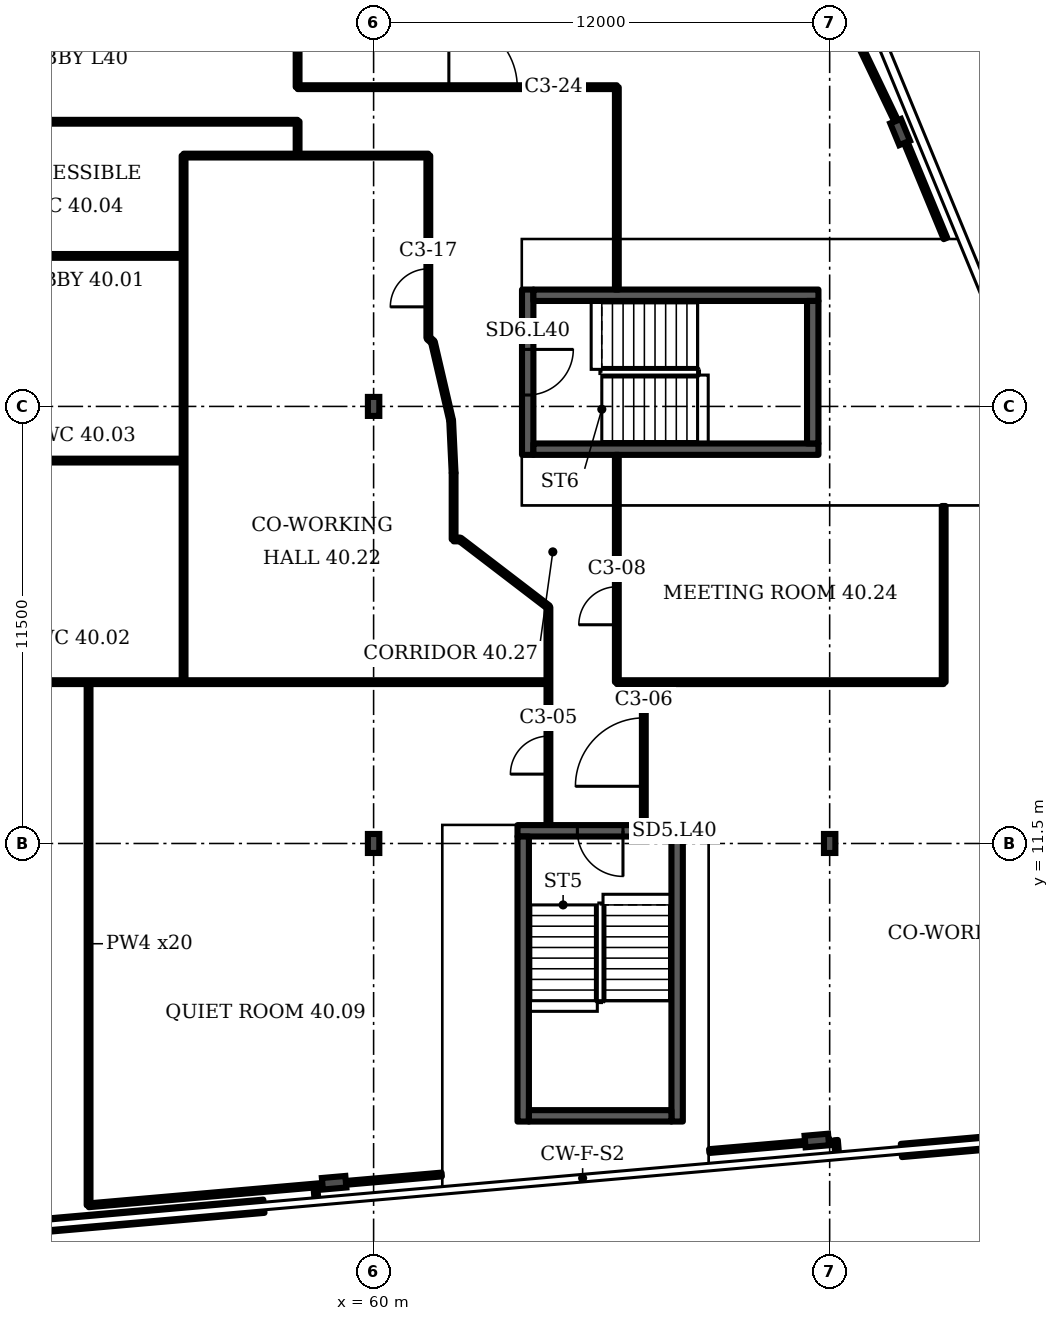
"""IFC4 building model, lengths in metres.
Left out: names, types, materials, properties, quantities, classifications, styles, units other than length and angle.
Written with IfcOpenShell. Run it as: python <this file> out.ifc"""

import sys

from ifc_helpers import new_model, si_unit, direction, frame, frame_2d, origin, origin_2d, place, context, subcontext, project, spatial, rectangle, i_section, extrude, element, fill, save


model = new_model("IFC4")
c1 = context("Model", 3, precision=1e-05, world=origin(), true_north=direction((0.0, 1.0)))
c2 = subcontext(c1, "Body", "Model", "MODEL_VIEW")
j1 = project(units=[si_unit("LENGTHUNIT", "METRE"), si_unit("PLANEANGLEUNIT", "RADIAN")], contexts=[c1])
p1 = place(None, origin())
s1 = spatial("IfcSite", under=j1, at=p1, CompositionType="ELEMENT")
p2 = place(p1, origin())
s2 = spatial("IfcBuilding", under=s1, at=p2, CompositionType="ELEMENT")
p3 = place(p2, frame((0.0, 0.0, 166.3)))
s3 = spatial("IfcBuildingStorey", under=s2, at=p3, CompositionType="ELEMENT", Elevation=166.3)
for number, where, z_axis, x_axis in (
    (1, (58.961, 2.573, 0.0), (0.0, 0.0, 1.0), (0.087, -0.996, 0.0)),
    (2, (71.662, 3.685, 0.0), (0.0, 0.0, 1.0), (0.087, -0.996, 0.0)),
    (3, (73.854, 30.219, 0.0), (0.0, 0.0, 1.0), (0.924, 0.382, 0.0)),
):
    element("IfcColumn", number, at=place(p3, frame(where, z_axis=z_axis, x_axis=x_axis)), inside=s3, PredefinedType="COLUMN", context=c2, shape_type="SweptSolid", body=[
        extrude(i_section(OverallWidth=0.305, OverallDepth=0.62, WebThickness=0.021, FlangeThickness=0.04, FilletRadius=0.027, at=origin_2d()), origin(), (0.0, 0.0, 1.0), 3.6),
    ])
for number, where, z_axis, x_axis in (
    (4, (60.0, 11.5, 0.0), (0.0, 0.0, 1.0), (1.0, 0.0, 0.0)),
    (5, (72.0, 11.5, 0.0), (0.0, 0.0, 1.0), (1.0, 0.0, 0.0)),
    (6, (60.0, 23.0, 0.0), (0.0, 0.0, 1.0), (1.0, 0.0, 0.0)),
):
    element("IfcColumn", number, at=place(p3, frame(where, z_axis=z_axis, x_axis=x_axis)), inside=s3, PredefinedType="COLUMN", context=c2, shape_type="SweptSolid", body=[
        extrude(i_section(OverallWidth=0.3, OverallDepth=0.5, WebThickness=0.014, FlangeThickness=0.028, FilletRadius=0.027, at=origin_2d()), origin(), (0.0, 0.0, 1.0), 3.6),
    ])
p4 = place(p3, frame((46.045, 0.987, 0.0), z_axis=(0.0, 0.0, 1.0), x_axis=(0.996193, 0.087171, 0.0)))
e7 = element("IfcWall", 7, at=p4, inside=s3, PredefinedType="SOLIDWALL", context=c2, shape_type="SweptSolid", body=[
    extrude(rectangle(XDim=11.11, YDim=0.35, at=frame_2d((5.555, 0.0))), origin(), (0.0, 0.0, 1.0), 1.0),
])
p5 = place(p3, frame((73.887, 3.423, 0.0), z_axis=(0.0, 0.0, 1.0), x_axis=(0.996197, 0.087145, 0.0)))
e8 = element("IfcWall", 8, at=p5, inside=s3, PredefinedType="SOLIDWALL", context=c2, shape_type="SweptSolid", body=[
    extrude(rectangle(XDim=9.323, YDim=0.35, at=frame_2d((4.662, 0.0))), origin(), (0.0, 0.0, 1.0), 1.0),
])
p6 = place(p3, frame((63.786, 11.834, 0.0), z_axis=(0.0, 0.0, 1.0), x_axis=(1.0, 0.0, 0.0)))
e9 = element("IfcWall", 9, at=p6, inside=s3, PredefinedType="SHEAR", context=c2, shape_type="SweptSolid", body=[
    extrude(rectangle(XDim=4.35, YDim=0.3, at=frame_2d((2.175, 0.0))), origin(), (0.0, 0.0, 1.0), 3.2),
])
p7 = place(p6, frame((1.575, 0.0, 0.0)))
e10 = element("IfcOpeningElement", 10, at=p7, cuts=e9, PredefinedType="OPENING", context=c2, shape_type="SweptSolid", body=[
    extrude(rectangle(XDim=1.2, YDim=2.1, at=frame_2d((0.6, 1.05))), frame((0.0, 0.16, 0.0), z_axis=(0.0, -1.0, 0.0), x_axis=(1.0, 0.0, 0.0)), (0.0, 0.0, 1.0), 0.32),
])
p8 = place(p3, frame((64.055, 21.725, 0.0), z_axis=(0.0, 0.0, 1.0), x_axis=(0.0, 1.0, 0.0)))
e11 = element("IfcWall", 11, at=p8, inside=s3, PredefinedType="SHEAR", context=c2, shape_type="SweptSolid", body=[
    extrude(rectangle(XDim=4.35, YDim=0.3, at=frame_2d((2.175, 0.0))), origin(), (0.0, 0.0, 1.0), 3.2),
])
p9 = place(p8, frame((1.575, 0.0, 0.0)))
e12 = element("IfcOpeningElement", 12, at=p9, cuts=e11, PredefinedType="OPENING", context=c2, shape_type="SweptSolid", body=[
    extrude(rectangle(XDim=1.2, YDim=2.1, at=frame_2d((0.6, 1.05))), frame((0.0, 0.16, 0.0), z_axis=(0.0, -1.0, 0.0), x_axis=(1.0, 0.0, 0.0)), (0.0, 0.0, 1.0), 0.32),
])
p10 = place(p3, frame((46.91, 15.745, 0.0), z_axis=(0.0, 0.0, 1.0), x_axis=(1.0, 0.0, 0.0)))
e13 = element("IfcWall", 13, at=p10, inside=s3, PredefinedType="PARTITIONING", context=c2, shape_type="SweptSolid", body=[
    extrude(rectangle(XDim=17.69, YDim=0.1, at=frame_2d((8.845, 0.0))), origin(), (0.0, 0.0, 1.0), 3.2),
])
p11 = place(p3, frame((46.91, 30.49, 0.0), z_axis=(0.0, 0.0, 1.0), x_axis=(1.0, 0.0, 0.0)))
e14 = element("IfcWall", 14, at=p11, inside=s3, PredefinedType="PARTITIONING", context=c2, shape_type="SweptSolid", body=[
    extrude(rectangle(XDim=11.09, YDim=0.1, at=frame_2d((5.545, 0.0))), origin(), (0.0, 0.0, 1.0), 3.2),
])
p12 = place(p11, frame((0.235, 0.0, 0.0)))
e15 = element("IfcOpeningElement", 15, at=p12, cuts=e14, PredefinedType="OPENING", context=c2, shape_type="SweptSolid", body=[
    extrude(rectangle(XDim=1.1, YDim=2.1, at=frame_2d((0.55, 1.05))), frame((0.0, 0.06, 0.0), z_axis=(0.0, -1.0, 0.0), x_axis=(1.0, 0.0, 0.0)), (0.0, 0.0, 1.0), 0.12),
])
for number, where, z_axis, x_axis in (
    (16, (48.7, 21.575, 0.0), (0.0, 0.0, 1.0), (1.0, 0.0, 0.0)),
    (17, (48.7, 26.96, 0.0), (0.0, 0.0, 1.0), (1.0, 0.0, 0.0)),
):
    element("IfcWall", number, at=place(p3, frame(where, z_axis=z_axis, x_axis=x_axis)), inside=s3, PredefinedType="PARTITIONING", context=c2, shape_type="SweptSolid", body=[
        extrude(rectangle(XDim=6.3, YDim=0.1, at=frame_2d((3.15, 0.0))), origin(), (0.0, 0.0, 1.0), 3.2),
    ])
p13 = place(p3, frame((52.5, 1.98, 0.0), z_axis=(0.0, 0.0, 1.0), x_axis=(0.0, 1.0, 0.0)))
e18 = element("IfcWall", 18, at=p13, inside=s3, PredefinedType="PARTITIONING", context=c2, shape_type="SweptSolid", body=[
    extrude(rectangle(XDim=13.765, YDim=0.1, at=frame_2d((6.883, 0.0))), origin(), (0.0, 0.0, 1.0), 3.2),
])
p14 = place(p3, frame((52.5, 1.98, 0.0), z_axis=(0.0, 0.0, 1.0), x_axis=(0.99622, 0.086844, 0.0)))
e19 = element("IfcWall", 19, at=p14, inside=s3, PredefinedType="PARTITIONING", context=c2, shape_type="SweptSolid", body=[
    extrude(rectangle(XDim=9.328, YDim=0.1, at=frame_2d((4.664, 0.0))), origin(), (0.0, 0.0, 1.0), 2.58),
])
p15 = place(p3, frame((55.0, 15.745, 0.0), z_axis=(0.0, 0.0, 1.0), x_axis=(0.0, 1.0, 0.0)))
e20 = element("IfcWall", 20, at=p15, inside=s3, PredefinedType="PARTITIONING", context=c2, shape_type="SweptSolid", body=[
    extrude(rectangle(XDim=13.855, YDim=0.1, at=frame_2d((6.927, 0.0))), origin(), (0.0, 0.0, 1.0), 3.2),
])
p16 = place(p3, frame((55.0, 29.6, 0.0), z_axis=(0.0, 0.0, 1.0), x_axis=(1.0, 0.0, 0.0)))
e21 = element("IfcWall", 21, at=p16, inside=s3, PredefinedType="PARTITIONING", context=c2, shape_type="SweptSolid", body=[
    extrude(rectangle(XDim=6.44, YDim=0.1, at=frame_2d((3.22, 0.0))), origin(), (0.0, 0.0, 1.0), 3.2),
])
p17 = place(p3, frame((58.0, 29.6, 0.0), z_axis=(0.0, 0.0, 1.0), x_axis=(0.0, 1.0, 0.0)))
e22 = element("IfcWall", 22, at=p17, inside=s3, PredefinedType="PARTITIONING", context=c2, shape_type="SweptSolid", body=[
    extrude(rectangle(XDim=0.9, YDim=0.1, at=frame_2d((0.45, 0.0))), origin(), (0.0, 0.0, 1.0), 3.2),
])
p18 = place(p3, frame((58.0, 31.4, 0.0), z_axis=(0.0, 0.0, 1.0), x_axis=(0.0, 1.0, 0.0)))
e23 = element("IfcWall", 23, at=p18, inside=s3, PredefinedType="PARTITIONING", context=c2, shape_type="SweptSolid", body=[
    extrude(rectangle(XDim=2.58, YDim=0.1, at=frame_2d((1.29, 0.0))), origin(), (0.0, 0.0, 1.0), 3.2),
])
p19 = place(p3, frame((58.0, 31.4, 0.0), z_axis=(0.0, 0.0, 1.0), x_axis=(1.0, 0.0, 0.0)))
e24 = element("IfcWall", 24, at=p19, inside=s3, PredefinedType="PARTITIONING", context=c2, shape_type="SweptSolid", body=[
    extrude(rectangle(XDim=8.4, YDim=0.1, at=frame_2d((4.2, 0.0))), origin(), (0.0, 0.0, 1.0), 3.2),
])
p20 = place(p19, frame((3.98, 0.0, 0.0)))
e25 = element("IfcOpeningElement", 25, at=p20, cuts=e24, PredefinedType="OPENING", context=c2, shape_type="SweptSolid", body=[
    extrude(rectangle(XDim=1.8, YDim=2.1, at=frame_2d((0.9, 1.05))), frame((0.0, 0.06, 0.0), z_axis=(0.0, -1.0, 0.0), x_axis=(1.0, 0.0, 0.0)), (0.0, 0.0, 1.0), 0.12),
])
p21 = place(p3, frame((58.498, 2.102, 0.0), z_axis=(0.0, 0.0, 1.0), x_axis=(-0.083045, 0.996542, 0.0)))
e26 = element("IfcWall", 26, at=p21, inside=s3, PredefinedType="PARTITIONING", context=c2, shape_type="SweptSolid", body=[
    extrude(rectangle(XDim=0.4, YDim=0.1, at=frame_2d((0.2, 0.0))), origin(), (0.0, 0.0, 1.0), 3.2),
])
p22 = place(p3, frame((61.44, 24.8, 0.0), z_axis=(0.0, 0.0, 1.0), x_axis=(0.0, 1.0, 0.0)))
e27 = element("IfcWall", 27, at=p22, inside=s3, PredefinedType="PARTITIONING", context=c2, shape_type="SweptSolid", body=[
    extrude(rectangle(XDim=4.8, YDim=0.1, at=frame_2d((2.4, 0.0))), origin(), (0.0, 0.0, 1.0), 3.2),
])
p23 = place(p22, frame((0.82, 0.0, 0.0)))
e28 = element("IfcOpeningElement", 28, at=p23, cuts=e27, PredefinedType="OPENING", context=c2, shape_type="SweptSolid", body=[
    extrude(rectangle(XDim=1.0, YDim=2.1, at=frame_2d((0.5, 1.05))), frame((0.0, 0.06, 0.0), z_axis=(0.0, -1.0, 0.0), x_axis=(1.0, 0.0, 0.0)), (0.0, 0.0, 1.0), 0.12),
])
p24 = place(p3, frame((61.56, 24.695, 0.0), z_axis=(0.0, 0.0, 1.0), x_axis=(-0.752958, 0.658073, 0.0)))
e29 = element("IfcWall", 29, at=p24, inside=s3, PredefinedType="PARTITIONING", context=c2, shape_type="SweptSolid", body=[
    extrude(rectangle(XDim=0.159, YDim=0.1, at=frame_2d((0.08, 0.0))), origin(), (0.0, 0.0, 1.0), 3.2),
])
p25 = place(p3, frame((62.04, 22.63, 0.0), z_axis=(0.0, 0.0, 1.0), x_axis=(-0.226381, 0.974037, 0.0)))
e30 = element("IfcWall", 30, at=p25, inside=s3, PredefinedType="PARTITIONING", context=c2, shape_type="SweptSolid", body=[
    extrude(rectangle(XDim=2.12, YDim=0.1, at=frame_2d((1.06, 0.0))), origin(), (0.0, 0.0, 1.0), 3.2),
])
p26 = place(p3, frame((62.105, 19.5, 0.0), z_axis=(0.0, 0.0, 1.0), x_axis=(0.0, 1.0, 0.0)))
e31 = element("IfcWall", 31, at=p26, inside=s3, PredefinedType="PARTITIONING", context=c2, shape_type="SweptSolid", body=[
    extrude(rectangle(XDim=1.75, YDim=0.1, at=frame_2d((0.875, 0.0))), origin(), (0.0, 0.0, 1.0), 3.2),
])
p27 = place(p3, frame((62.105, 19.5, 0.0), z_axis=(0.0, 0.0, 1.0), x_axis=(1.0, 0.0, 0.0)))
e32 = element("IfcWall", 32, at=p27, inside=s3, PredefinedType="PARTITIONING", context=c2, shape_type="SweptSolid", body=[
    extrude(rectangle(XDim=0.17, YDim=0.1, at=frame_2d((0.085, 0.0))), origin(), (0.0, 0.0, 1.0), 3.2),
])
p28 = place(p3, frame((62.105, 21.25, 0.0), z_axis=(0.0, 0.0, 1.0), x_axis=(-0.047011, 0.998895, 0.0)))
e33 = element("IfcWall", 33, at=p28, inside=s3, PredefinedType="PARTITIONING", context=c2, shape_type="SweptSolid", body=[
    extrude(rectangle(XDim=1.381, YDim=0.1, at=frame_2d((0.691, 0.0))), origin(), (0.0, 0.0, 1.0), 3.2),
])
p29 = place(p3, frame((64.6, 12.004, 0.0), z_axis=(0.0, 0.0, 1.0), x_axis=(0.0, 1.0, 0.0)))
e34 = element("IfcWall", 34, at=p29, inside=s3, PredefinedType="PARTITIONING", context=c2, shape_type="SweptSolid", body=[
    extrude(rectangle(XDim=5.716, YDim=0.1, at=frame_2d((2.858, 0.0))), origin(), (0.0, 0.0, 1.0), 3.2),
])
p30 = place(p29, frame((1.321, 0.0, 0.0)))
e35 = element("IfcOpeningElement", 35, at=p30, cuts=e34, PredefinedType="OPENING", context=c2, shape_type="SweptSolid", body=[
    extrude(rectangle(XDim=1.0, YDim=2.1, at=frame_2d((0.5, 1.05))), frame((0.0, 0.06, 0.0), z_axis=(0.0, -1.0, 0.0), x_axis=(1.0, 0.0, 0.0)), (0.0, 0.0, 1.0), 0.12),
])
p31 = place(p3, frame((64.6, 17.72, 0.0), z_axis=(0.0, 0.0, 1.0), x_axis=(-0.794036, 0.607866, 0.0)))
e36 = element("IfcWall", 36, at=p31, inside=s3, PredefinedType="PARTITIONING", context=c2, shape_type="SweptSolid", body=[
    extrude(rectangle(XDim=2.928, YDim=0.1, at=frame_2d((1.464, 0.0))), origin(), (0.0, 0.0, 1.0), 3.2),
])
p32 = place(p3, frame((66.4, 15.745, 0.0), z_axis=(0.0, 0.0, 1.0), x_axis=(0.0, 1.0, 0.0)))
e37 = element("IfcWall", 37, at=p32, inside=s3, PredefinedType="PARTITIONING", context=c2, shape_type="SweptSolid", body=[
    extrude(rectangle(XDim=5.98, YDim=0.1, at=frame_2d((2.99, 0.0))), origin(), (0.0, 0.0, 1.0), 3.2),
])
p33 = place(p32, frame((1.51, 0.0, 0.0)))
e38 = element("IfcOpeningElement", 38, at=p33, cuts=e37, PredefinedType="OPENING", context=c2, shape_type="SweptSolid", body=[
    extrude(rectangle(XDim=1.0, YDim=2.1, at=frame_2d((0.5, 1.05))), frame((0.0, 0.06, 0.0), z_axis=(0.0, -1.0, 0.0), x_axis=(1.0, 0.0, 0.0)), (0.0, 0.0, 1.0), 0.12),
])
p34 = place(p3, frame((66.4, 15.745, 0.0), z_axis=(0.0, 0.0, 1.0), x_axis=(1.0, 0.0, 0.0)))
e39 = element("IfcWall", 39, at=p34, inside=s3, PredefinedType="PARTITIONING", context=c2, shape_type="SweptSolid", body=[
    extrude(rectangle(XDim=8.6, YDim=0.1, at=frame_2d((4.3, 0.0))), origin(), (0.0, 0.0, 1.0), 3.2),
])
p35 = place(p3, frame((66.4, 26.075, 0.0), z_axis=(0.0, 0.0, 1.0), x_axis=(0.0, 1.0, 0.0)))
e40 = element("IfcWall", 40, at=p35, inside=s3, PredefinedType="PARTITIONING", context=c2, shape_type="SweptSolid", body=[
    extrude(rectangle(XDim=5.325, YDim=0.1, at=frame_2d((2.663, 0.0))), origin(), (0.0, 0.0, 1.0), 3.2),
])
p36 = place(p3, frame((67.11, 12.004, 0.0), z_axis=(0.0, 0.0, 1.0), x_axis=(0.0, 1.0, 0.0)))
e41 = element("IfcWall", 41, at=p36, inside=s3, PredefinedType="PARTITIONING", context=c2, shape_type="SweptSolid", body=[
    extrude(rectangle(XDim=3.741, YDim=0.1, at=frame_2d((1.871, 0.0))), origin(), (0.0, 0.0, 1.0), 3.2),
])
p37 = place(p36, frame((1.001, 0.0, 0.0)))
e42 = element("IfcOpeningElement", 42, at=p37, cuts=e41, PredefinedType="OPENING", context=c2, shape_type="SweptSolid", body=[
    extrude(rectangle(XDim=1.8, YDim=2.1, at=frame_2d((0.9, 1.05))), frame((0.0, 0.06, 0.0), z_axis=(0.0, -1.0, 0.0), x_axis=(1.0, 0.0, 0.0)), (0.0, 0.0, 1.0), 0.12),
])
p38 = place(p3, frame((68.831, 3.407, 0.0), z_axis=(0.0, 0.0, 1.0), x_axis=(0.996308, 0.085898, 0.0)))
e43 = element("IfcWall", 43, at=p38, inside=s3, PredefinedType="PARTITIONING", context=c2, shape_type="SweptSolid", body=[
    extrude(rectangle(XDim=3.18, YDim=0.1, at=frame_2d((1.59, 0.0))), origin(), (0.0, 0.0, 1.0), 2.58),
])
p39 = place(p3, frame((72.198, 3.3, 0.0), z_axis=(0.0, 0.0, 1.0), x_axis=(-0.083759, 0.996486, 0.0)))
e44 = element("IfcWall", 44, at=p39, inside=s3, PredefinedType="PARTITIONING", context=c2, shape_type="SweptSolid", body=[
    extrude(rectangle(XDim=0.396, YDim=0.1, at=frame_2d((0.198, 0.0))), origin(), (0.0, 0.0, 1.0), 3.2),
])
p40 = place(p3, frame((73.885, 30.23, 0.0), z_axis=(0.0, 0.0, 1.0), x_axis=(-0.432129, 0.901808, 0.0)))
e45 = element("IfcWall", 45, at=p40, inside=s3, PredefinedType="PARTITIONING", context=c2, shape_type="SweptSolid", body=[
    extrude(rectangle(XDim=13.029, YDim=0.1, at=frame_2d((6.515, 0.0))), origin(), (0.0, 0.0, 1.0), 2.58),
])
p41 = place(p3, frame((75.0, 15.745, 0.0), z_axis=(0.0, 0.0, 1.0), x_axis=(0.0, 1.0, 0.0)))
e46 = element("IfcWall", 46, at=p41, inside=s3, PredefinedType="PARTITIONING", context=c2, shape_type="SweptSolid", body=[
    extrude(rectangle(XDim=4.635, YDim=0.1, at=frame_2d((2.317, 0.0))), origin(), (0.0, 0.0, 1.0), 3.2),
])
p42 = place(p3, frame((75.047, 27.42, 0.0), z_axis=(0.0, 0.0, 1.0), x_axis=(-0.382024, 0.924148, 0.0)))
e47 = element("IfcWall", 47, at=p42, inside=s3, PredefinedType="PARTITIONING", context=c2, shape_type="SweptSolid", body=[
    extrude(rectangle(XDim=3.041, YDim=0.1, at=frame_2d((1.521, 0.0))), origin(), (0.0, 0.0, 1.0), 2.58),
])
for number, where, z_axis, x_axis in (
    (48, (63.936, 4.184, 0.0), (0.0, 0.0, 1.0), (0.0, 1.0, 0.0)),
    (49, (67.986, 4.184, 0.0), (0.0, 0.0, 1.0), (0.0, 1.0, 0.0)),
):
    element("IfcWall", number, at=place(p3, frame(where, z_axis=z_axis, x_axis=x_axis)), inside=s3, PredefinedType="SHEAR", context=c2, shape_type="SweptSolid", body=[
        extrude(rectangle(XDim=7.5, YDim=0.3, at=frame_2d((3.75, 0.0))), origin(), (0.0, 0.0, 1.0), 3.2),
    ])
p43 = place(p3, frame((64.086, 4.334, 0.0), z_axis=(0.0, 0.0, 1.0), x_axis=(1.0, 0.0, 0.0)))
e50 = element("IfcWall", 50, at=p43, inside=s3, PredefinedType="SHEAR", context=c2, shape_type="SweptSolid", body=[
    extrude(rectangle(XDim=3.75, YDim=0.3, at=frame_2d((1.875, 0.0))), origin(), (0.0, 0.0, 1.0), 3.2),
])
for number, where, z_axis, x_axis in (
    (51, (64.205, 21.875, 0.0), (0.0, 0.0, 1.0), (1.0, 0.0, 0.0)),
    (52, (64.205, 25.925, 0.0), (0.0, 0.0, 1.0), (1.0, 0.0, 0.0)),
):
    element("IfcWall", number, at=place(p3, frame(where, z_axis=z_axis, x_axis=x_axis)), inside=s3, PredefinedType="SHEAR", context=c2, shape_type="SweptSolid", body=[
        extrude(rectangle(XDim=7.5, YDim=0.3, at=frame_2d((3.75, 0.0))), origin(), (0.0, 0.0, 1.0), 3.2),
    ])
p44 = place(p3, frame((71.555, 22.025, 0.0), z_axis=(0.0, 0.0, 1.0), x_axis=(0.0, 1.0, 0.0)))
e53 = element("IfcWall", 53, at=p44, inside=s3, PredefinedType="SHEAR", context=c2, shape_type="SweptSolid", body=[
    extrude(rectangle(XDim=3.75, YDim=0.3, at=frame_2d((1.875, 0.0))), origin(), (0.0, 0.0, 1.0), 3.2),
])
p45 = place(p7, origin())
e54 = element("IfcDoor", 54, at=p45, inside=s3, OperationType="SINGLE_SWING_RIGHT", PredefinedType="DOOR", context=c2, shape_type="SweptSolid", body=[
    extrude(rectangle(XDim=1.2, YDim=2.1, at=frame_2d((0.6, 1.05))), frame((0.0, 0.025, 0.0), z_axis=(0.0, -1.0, 0.0), x_axis=(1.0, 0.0, 0.0)), (0.0, 0.0, 1.0), 0.05),
])
fill(e10, e54)
p46 = place(p9, origin())
e55 = element("IfcDoor", 55, at=p46, inside=s3, OperationType="SINGLE_SWING_RIGHT", PredefinedType="DOOR", context=c2, shape_type="SweptSolid", body=[
    extrude(rectangle(XDim=1.2, YDim=2.1, at=frame_2d((0.6, 1.05))), frame((0.0, 0.025, 0.0), z_axis=(0.0, -1.0, 0.0), x_axis=(1.0, 0.0, 0.0)), (0.0, 0.0, 1.0), 0.05),
])
fill(e12, e55)
p47 = place(p30, origin())
e56 = element("IfcDoor", 56, at=p47, inside=s3, OperationType="SINGLE_SWING_LEFT", PredefinedType="DOOR", context=c2, shape_type="SweptSolid", body=[
    extrude(rectangle(XDim=1.0, YDim=2.1, at=frame_2d((0.5, 1.05))), frame((0.0, 0.025, 0.0), z_axis=(0.0, -1.0, 0.0), x_axis=(1.0, 0.0, 0.0)), (0.0, 0.0, 1.0), 0.05),
])
fill(e35, e56)
p48 = place(p37, origin())
e57 = element("IfcDoor", 57, at=p48, inside=s3, OperationType="DOUBLE_DOOR_SINGLE_SWING", PredefinedType="DOOR", context=c2, shape_type="SweptSolid", body=[
    extrude(rectangle(XDim=1.8, YDim=2.1, at=frame_2d((0.9, 1.05))), frame((0.0, 0.025, 0.0), z_axis=(0.0, -1.0, 0.0), x_axis=(1.0, 0.0, 0.0)), (0.0, 0.0, 1.0), 0.05),
])
fill(e42, e57)
p49 = place(p33, origin())
e58 = element("IfcDoor", 58, at=p49, inside=s3, OperationType="SINGLE_SWING_LEFT", PredefinedType="DOOR", context=c2, shape_type="SweptSolid", body=[
    extrude(rectangle(XDim=1.0, YDim=2.1, at=frame_2d((0.5, 1.05))), frame((0.0, 0.025, 0.0), z_axis=(0.0, -1.0, 0.0), x_axis=(1.0, 0.0, 0.0)), (0.0, 0.0, 1.0), 0.05),
])
fill(e38, e58)
p50 = place(p23, origin())
e59 = element("IfcDoor", 59, at=p50, inside=s3, OperationType="SINGLE_SWING_LEFT", PredefinedType="DOOR", context=c2, shape_type="SweptSolid", body=[
    extrude(rectangle(XDim=1.0, YDim=2.1, at=frame_2d((0.5, 1.05))), frame((0.0, 0.025, 0.0), z_axis=(0.0, -1.0, 0.0), x_axis=(1.0, 0.0, 0.0)), (0.0, 0.0, 1.0), 0.05),
])
fill(e28, e59)
p51 = place(p20, origin())
e60 = element("IfcDoor", 60, at=p51, inside=s3, OperationType="DOUBLE_DOOR_SINGLE_SWING", PredefinedType="DOOR", context=c2, shape_type="SweptSolid", body=[
    extrude(rectangle(XDim=1.8, YDim=2.1, at=frame_2d((0.9, 1.05))), frame((0.0, 0.025, 0.0), z_axis=(0.0, -1.0, 0.0), x_axis=(1.0, 0.0, 0.0)), (0.0, 0.0, 1.0), 0.05),
])
fill(e25, e60)
save(model, sys.argv[1])
